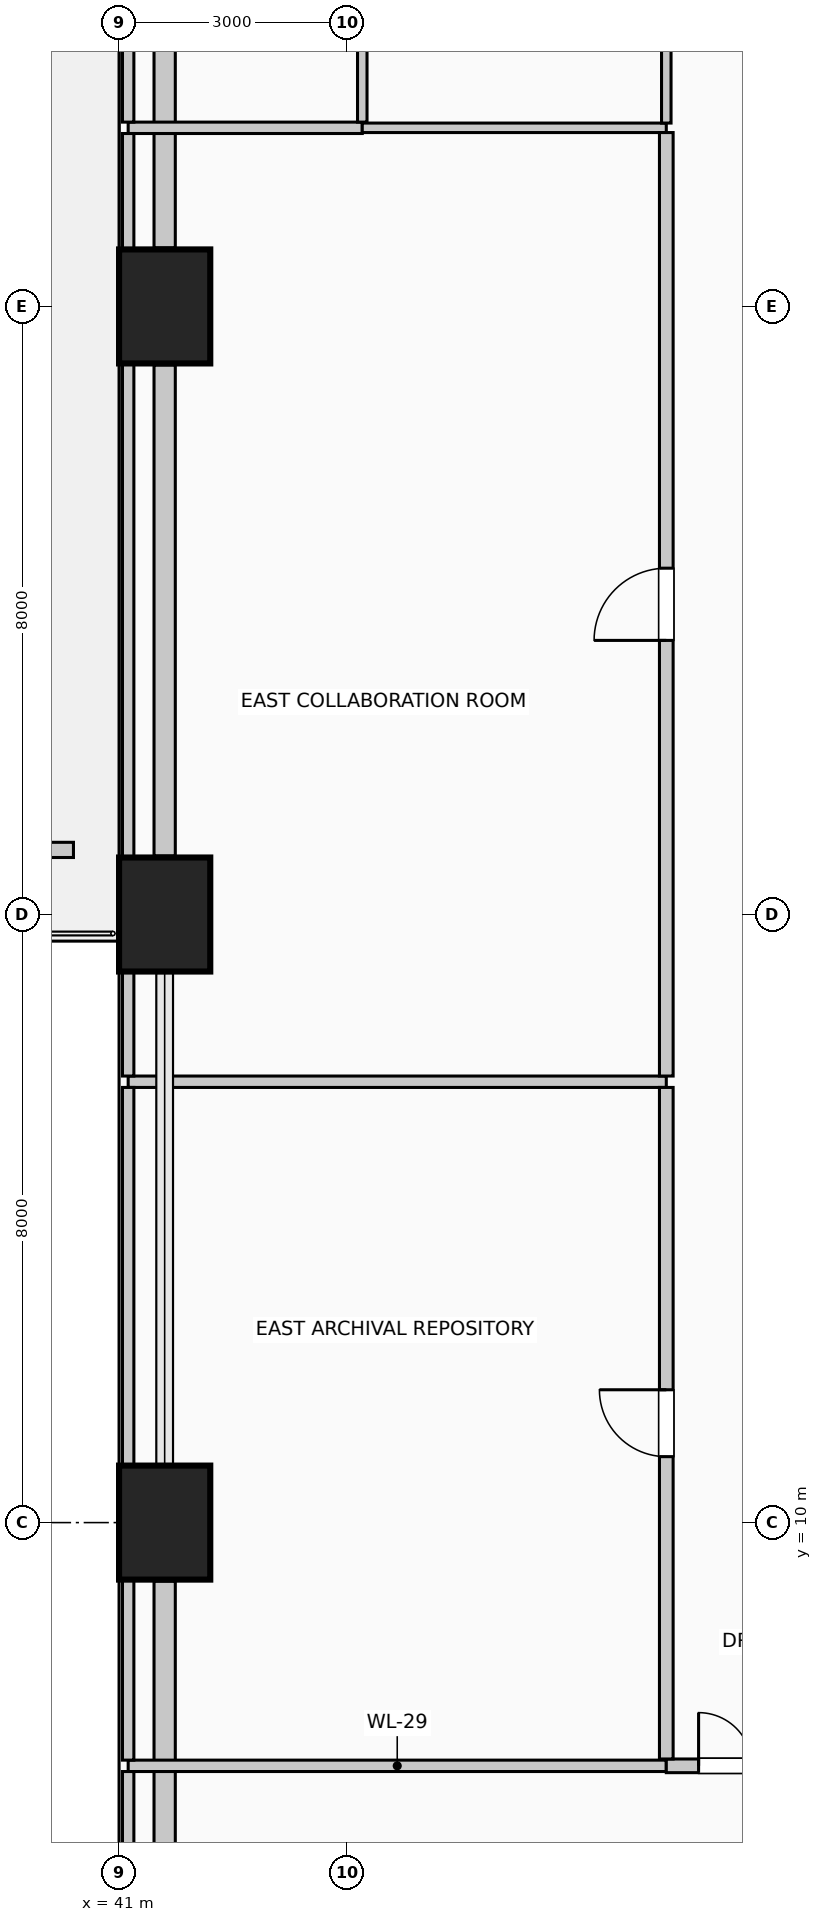
"""IFC4 building model, lengths in metres.
Left out: names, types, materials, properties, quantities, classifications, styles, units other than length and angle.
Written with IfcOpenShell. Run it as: python <this file> out.ifc"""

import sys

from ifc_helpers import new_model, si_unit, direction, frame, frame_2d, origin, origin_2d, place, context, subcontext, project, spatial, rectangle, extrude, element, fill, save


model = new_model("IFC4")
c1 = context("Model", 3, precision=1e-05, world=origin(), true_north=direction((0.0, 1.0)))
c2 = subcontext(c1, "Body", "Model", "MODEL_VIEW")
j1 = project(units=[si_unit("LENGTHUNIT", "METRE"), si_unit("PLANEANGLEUNIT", "RADIAN")], contexts=[c1])
p1 = place(None, origin())
s1 = spatial("IfcSite", under=j1, at=p1, CompositionType="ELEMENT")
p2 = place(p1, origin())
s2 = spatial("IfcBuilding", under=s1, at=p2, CompositionType="ELEMENT")
p3 = place(p2, frame((0.0, 0.0, 38.6)))
s3 = spatial("IfcBuildingStorey", under=s2, at=p3, CompositionType="ELEMENT", Elevation=38.6)
for number, where, z_axis, x_axis in (
    (1, (41.6, 10.0, 0.0), (0.0, 0.0, 1.0), (1.0, 0.0, 0.0)),
    (2, (41.6, 18.0, 0.0), (0.0, 0.0, 1.0), (1.0, 0.0, 0.0)),
    (3, (41.6, 26.0, 0.0), (0.0, 0.0, 1.0), (1.0, 0.0, 0.0)),
):
    element("IfcColumn", number, at=place(p3, frame(where, z_axis=z_axis, x_axis=x_axis)), inside=s3, PredefinedType="COLUMN", context=c2, shape_type="SweptSolid", body=[
        extrude(rectangle(XDim=1.2, YDim=1.5, at=origin_2d()), origin(), (0.0, 0.0, 1.0), 4.0),
    ])
p4 = place(p3, frame((41.6, 1.37, 0.0), z_axis=(0.0, 0.0, 1.0), x_axis=(0.0, 1.0, 0.0)))
e4 = element("IfcWall", 4, at=p4, inside=s3, PredefinedType="SOLIDWALL", context=c2, shape_type="SweptSolid", body=[
    extrude(rectangle(XDim=7.86, YDim=0.28, at=frame_2d((3.93, 0.0))), origin(), (0.0, 0.0, 1.0), 3.0),
])
p5 = place(p4, frame((1.153, 0.0, 0.42)))
e5 = element("IfcOpeningElement", 5, at=p5, cuts=e4, PredefinedType="OPENING", context=c2, shape_type="SweptSolid", body=[
    extrude(rectangle(XDim=2.2, YDim=1.95, at=frame_2d((1.1, 0.975))), frame((0.0, 0.15, 0.0), z_axis=(0.0, -1.0, 0.0), x_axis=(1.0, 0.0, 0.0)), (0.0, 0.0, 1.0), 0.3),
])
p6 = place(p3, frame((41.6, 18.77, 0.0), z_axis=(0.0, 0.0, 1.0), x_axis=(0.0, 1.0, 0.0)))
e6 = element("IfcWall", 6, at=p6, inside=s3, PredefinedType="SOLIDWALL", context=c2, shape_type="SweptSolid", body=[
    extrude(rectangle(XDim=6.46, YDim=0.28, at=frame_2d((3.23, 0.0))), origin(), (0.0, 0.0, 1.0), 3.0),
])
p7 = place(p3, frame((41.6, 26.77, 0.0), z_axis=(0.0, 0.0, 1.0), x_axis=(0.0, 1.0, 0.0)))
e7 = element("IfcWall", 7, at=p7, inside=s3, PredefinedType="SOLIDWALL", context=c2, shape_type="SweptSolid", body=[
    extrude(rectangle(XDim=6.71, YDim=0.28, at=frame_2d((3.355, 0.0))), origin(), (0.0, 0.0, 1.0), 3.0),
])
p8 = place(p3, frame((17.6, 18.85, 0.0), z_axis=(0.0, 0.0, 1.0), x_axis=(1.0, 0.0, 0.0)))
e8 = element("IfcWall", 8, at=p8, inside=s3, PredefinedType="USERDEFINED", context=c2, shape_type="SweptSolid", body=[
    extrude(rectangle(XDim=22.8, YDim=0.2, at=frame_2d((11.4, 0.0))), origin(), (0.0, 0.0, 1.0), 0.55),
])
p9 = place(p3, frame((41.12, 6.8, 0.0), z_axis=(0.0, 0.0, 1.0), x_axis=(1.0, 0.0, 0.0)))
e9 = element("IfcWall", 9, at=p9, inside=s3, PredefinedType="PARTITIONING", context=c2, shape_type="SweptSolid", body=[
    extrude(rectangle(XDim=7.08, YDim=0.15, at=frame_2d((3.54, 0.0))), origin(), (0.0, 0.0, 1.0), 3.095),
])
p10 = place(p3, frame((48.2, 6.8, 0.0), z_axis=(0.0, 0.0, 1.0), x_axis=(1.0, 0.0, 0.0)))
e10 = element("IfcWall", 10, at=p10, inside=s3, PredefinedType="PARTITIONING", context=c2, shape_type="SweptSolid", body=[
    extrude(rectangle(XDim=2.25, YDim=0.18, at=frame_2d((1.125, 0.0))), origin(), (0.0, 0.0, 1.0), 3.095),
])
p11 = place(p10, frame((0.425, 0.0, 0.0)))
e11 = element("IfcOpeningElement", 11, at=p11, cuts=e10, PredefinedType="OPENING", context=c2, shape_type="SweptSolid", body=[
    extrude(rectangle(XDim=1.4, YDim=2.2, at=frame_2d((0.7, 1.1))), frame((0.0, 0.1, 0.0), z_axis=(0.0, -1.0, 0.0), x_axis=(1.0, 0.0, 0.0)), (0.0, 0.0, 1.0), 0.2),
])
p12 = place(p3, frame((41.12, 15.8, 0.0), z_axis=(0.0, 0.0, 1.0), x_axis=(1.0, 0.0, 0.0)))
e12 = element("IfcWall", 12, at=p12, inside=s3, PredefinedType="PARTITIONING", context=c2, shape_type="SweptSolid", body=[
    extrude(rectangle(XDim=7.08, YDim=0.15, at=frame_2d((3.54, 0.0))), origin(), (0.0, 0.0, 1.0), 3.7),
])
p13 = place(p3, frame((41.12, 28.35, 0.0), z_axis=(0.0, 0.0, 1.0), x_axis=(1.0, 0.0, 0.0)))
e13 = element("IfcWall", 13, at=p13, inside=s3, PredefinedType="PARTITIONING", context=c2, shape_type="SweptSolid", body=[
    extrude(rectangle(XDim=3.08, YDim=0.15, at=frame_2d((1.54, 0.0))), origin(), (0.0, 0.0, 1.0), 3.7),
])
p14 = place(p3, frame((44.2, 28.35, 0.0), z_axis=(0.0, 0.0, 1.0), x_axis=(1.0, 0.0, 0.0)))
e14 = element("IfcWall", 14, at=p14, inside=s3, PredefinedType="PARTITIONING", context=c2, shape_type="SweptSolid", body=[
    extrude(rectangle(XDim=4.0, YDim=0.125, at=frame_2d((2.0, 0.0))), origin(), (0.0, 0.0, 1.0), 3.7),
])
p15 = place(p3, frame((41.12, 1.35, 0.0), z_axis=(0.0, 0.0, 1.0), x_axis=(0.0, 1.0, 0.0)))
e15 = element("IfcWall", 15, at=p15, inside=s3, PredefinedType="PARTITIONING", context=c2, shape_type="SweptSolid", body=[
    extrude(rectangle(XDim=5.375, YDim=0.15, at=frame_2d((2.688, 0.0))), origin(), (0.0, 0.0, 1.0), 3.7),
])
p16 = place(p3, frame((41.12, 6.875, 0.0), z_axis=(0.0, 0.0, 1.0), x_axis=(0.0, 1.0, 0.0)))
e16 = element("IfcWall", 16, at=p16, inside=s3, PredefinedType="PARTITIONING", context=c2, shape_type="SweptSolid", body=[
    extrude(rectangle(XDim=2.375, YDim=0.15, at=frame_2d((1.188, 0.0))), origin(), (0.0, 0.0, 1.0), 3.7),
])
p17 = place(p3, frame((41.12, 10.75, 0.0), z_axis=(0.0, 0.0, 1.0), x_axis=(0.0, 1.0, 0.0)))
e17 = element("IfcWall", 17, at=p17, inside=s3, PredefinedType="PARTITIONING", context=c2, shape_type="SweptSolid", body=[
    extrude(rectangle(XDim=4.975, YDim=0.15, at=frame_2d((2.488, 0.0))), origin(), (0.0, 0.0, 1.0), 3.7),
])
p18 = place(p3, frame((41.12, 15.875, 0.0), z_axis=(0.0, 0.0, 1.0), x_axis=(0.0, 1.0, 0.0)))
e18 = element("IfcWall", 18, at=p18, inside=s3, PredefinedType="PARTITIONING", context=c2, shape_type="SweptSolid", body=[
    extrude(rectangle(XDim=1.375, YDim=0.15, at=frame_2d((0.688, 0.0))), origin(), (0.0, 0.0, 1.0), 3.7),
])
p19 = place(p3, frame((41.12, 18.75, 0.0), z_axis=(0.0, 0.0, 1.0), x_axis=(0.0, 1.0, 0.0)))
e19 = element("IfcWall", 19, at=p19, inside=s3, PredefinedType="PARTITIONING", context=c2, shape_type="SweptSolid", body=[
    extrude(rectangle(XDim=6.5, YDim=0.15, at=frame_2d((3.25, 0.0))), origin(), (0.0, 0.0, 1.0), 3.7),
])
p20 = place(p3, frame((41.12, 26.75, 0.0), z_axis=(0.0, 0.0, 1.0), x_axis=(0.0, 1.0, 0.0)))
e20 = element("IfcWall", 20, at=p20, inside=s3, PredefinedType="PARTITIONING", context=c2, shape_type="SweptSolid", body=[
    extrude(rectangle(XDim=1.525, YDim=0.15, at=frame_2d((0.762, 0.0))), origin(), (0.0, 0.0, 1.0), 3.7),
])
p21 = place(p3, frame((41.12, 28.425, 0.0), z_axis=(0.0, 0.0, 1.0), x_axis=(0.0, 1.0, 0.0)))
e21 = element("IfcWall", 21, at=p21, inside=s3, PredefinedType="PARTITIONING", context=c2, shape_type="SweptSolid", body=[
    extrude(rectangle(XDim=3.925, YDim=0.15, at=frame_2d((1.962, 0.0))), origin(), (0.0, 0.0, 1.0), 3.7),
])
p22 = place(p3, frame((44.2, 28.425, 0.0), z_axis=(0.0, 0.0, 1.0), x_axis=(0.0, 1.0, 0.0)))
e22 = element("IfcWall", 22, at=p22, inside=s3, PredefinedType="PARTITIONING", context=c2, shape_type="SweptSolid", body=[
    extrude(rectangle(XDim=3.85, YDim=0.125, at=frame_2d((1.925, 0.0))), origin(), (0.0, 0.0, 1.0), 3.7),
])
p23 = place(p3, frame((48.2, 6.89, 0.0), z_axis=(0.0, 0.0, 1.0), x_axis=(0.0, 1.0, 0.0)))
e23 = element("IfcWall", 23, at=p23, inside=s3, PredefinedType="PARTITIONING", context=c2, shape_type="SweptSolid", body=[
    extrude(rectangle(XDim=8.835, YDim=0.18, at=frame_2d((4.417, 0.0))), origin(), (0.0, 0.0, 1.0), 3.7),
])
p24 = place(p23, frame((3.978, 0.0, 0.0)))
e24 = element("IfcOpeningElement", 24, at=p24, cuts=e23, PredefinedType="OPENING", context=c2, shape_type="SweptSolid", body=[
    extrude(rectangle(XDim=0.88, YDim=2.1, at=frame_2d((0.44, 1.05))), frame((0.0, 0.1, 0.0), z_axis=(0.0, -1.0, 0.0), x_axis=(1.0, 0.0, 0.0)), (0.0, 0.0, 1.0), 0.2),
])
p25 = place(p3, frame((48.2, 15.875, 0.0), z_axis=(0.0, 0.0, 1.0), x_axis=(0.0, 1.0, 0.0)))
e25 = element("IfcWall", 25, at=p25, inside=s3, PredefinedType="PARTITIONING", context=c2, shape_type="SweptSolid", body=[
    extrude(rectangle(XDim=12.413, YDim=0.18, at=frame_2d((6.206, 0.0))), origin(), (0.0, 0.0, 1.0), 3.7),
])
p26 = place(p25, frame((5.731, 0.0, 0.0)))
e26 = element("IfcOpeningElement", 26, at=p26, cuts=e25, PredefinedType="OPENING", context=c2, shape_type="SweptSolid", body=[
    extrude(rectangle(XDim=0.95, YDim=2.15, at=frame_2d((0.475, 1.075))), frame((0.0, 0.1, 0.0), z_axis=(0.0, -1.0, 0.0), x_axis=(1.0, 0.0, 0.0)), (0.0, 0.0, 1.0), 0.2),
])
p27 = place(p3, frame((48.2, 28.413, 0.0), z_axis=(0.0, 0.0, 1.0), x_axis=(0.0, 1.0, 0.0)))
e27 = element("IfcWall", 27, at=p27, inside=s3, PredefinedType="PARTITIONING", context=c2, shape_type="SweptSolid", body=[
    extrude(rectangle(XDim=3.875, YDim=0.125, at=frame_2d((1.938, 0.0))), origin(), (0.0, 0.0, 1.0), 3.7),
])
p28 = place(p11, origin())
e28 = element("IfcDoor", 28, at=p28, inside=s3, OperationType="DOUBLE_DOOR_SINGLE_SWING", PredefinedType="DOOR", context=c2, shape_type="SweptSolid", body=[
    extrude(rectangle(XDim=1.4, YDim=2.2, at=frame_2d((0.7, 1.1))), frame((0.0, 0.025, 0.0), z_axis=(0.0, -1.0, 0.0), x_axis=(1.0, 0.0, 0.0)), (0.0, 0.0, 1.0), 0.05),
])
fill(e11, e28)
p29 = place(p24, origin())
e29 = element("IfcDoor", 29, at=p29, inside=s3, OperationType="SINGLE_SWING_RIGHT", PredefinedType="DOOR", context=c2, shape_type="SweptSolid", body=[
    extrude(rectangle(XDim=0.88, YDim=2.1, at=frame_2d((0.44, 1.05))), frame((0.0, 0.025, 0.0), z_axis=(0.0, -1.0, 0.0), x_axis=(1.0, 0.0, 0.0)), (0.0, 0.0, 1.0), 0.05),
])
fill(e24, e29)
p30 = place(p26, origin())
e30 = element("IfcDoor", 30, at=p30, inside=s3, OperationType="SINGLE_SWING_LEFT", PredefinedType="DOOR", context=c2, shape_type="SweptSolid", body=[
    extrude(rectangle(XDim=0.95, YDim=2.15, at=frame_2d((0.475, 1.075))), frame((0.0, 0.025, 0.0), z_axis=(0.0, -1.0, 0.0), x_axis=(1.0, 0.0, 0.0)), (0.0, 0.0, 1.0), 0.05),
])
fill(e26, e30)
save(model, sys.argv[1])
